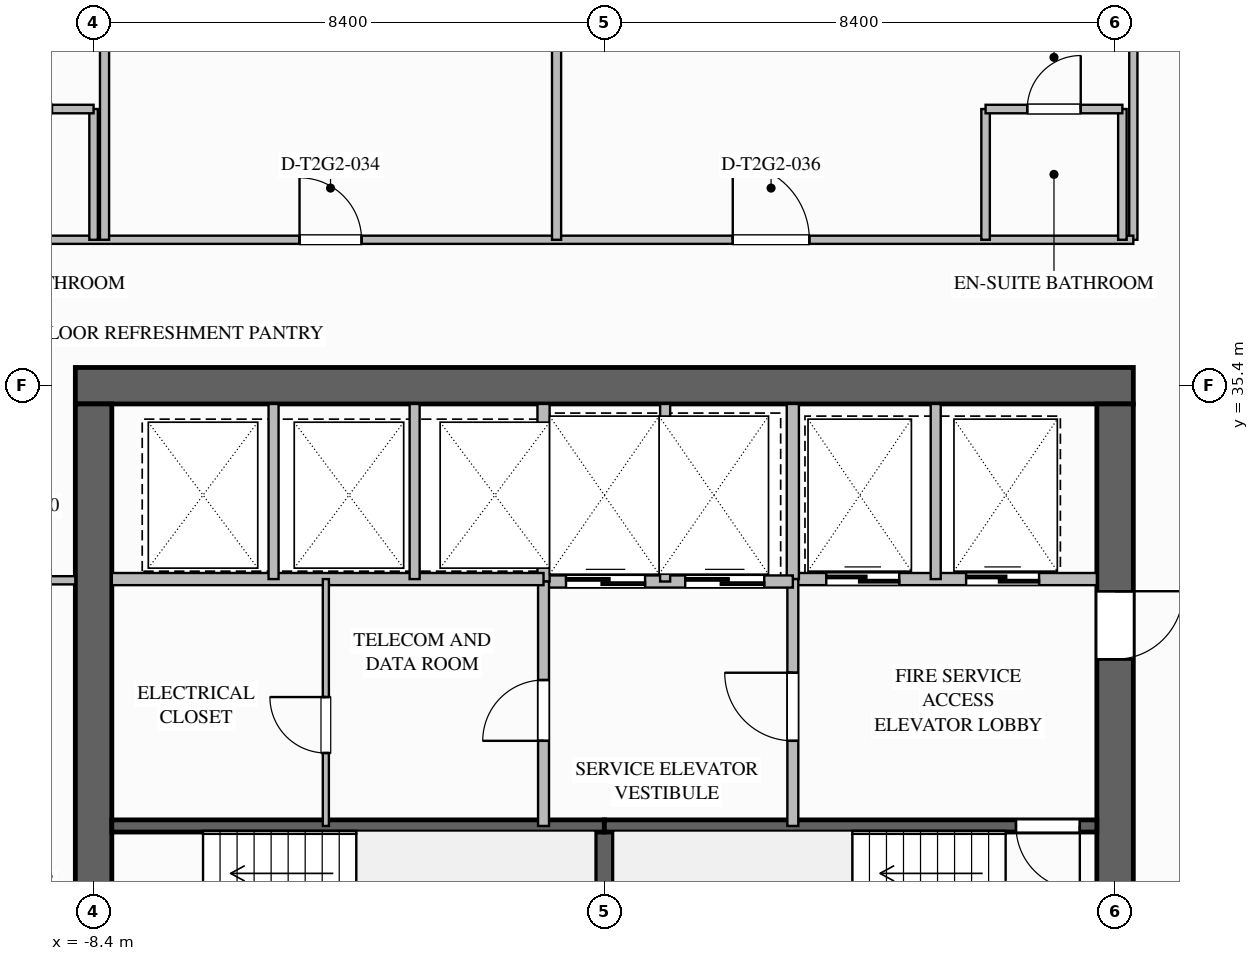
"""IFC4 building model, lengths in metres.
Left out: names, types, materials, properties, quantities, classifications, styles, units other than length and angle.
Written with IfcOpenShell. Run it as: python <this file> out.ifc"""

import sys

from ifc_helpers import new_model, si_unit, direction, frame, frame_2d, origin, place, context, subcontext, project, spatial, rectangle, extrude, element, fill, save


model = new_model("IFC4")
c1 = context("Model", 3, precision=1e-05, world=origin(), true_north=direction((0.0, 1.0)))
c2 = subcontext(c1, "Body", "Model", "MODEL_VIEW")
j1 = project(units=[si_unit("LENGTHUNIT", "METRE"), si_unit("PLANEANGLEUNIT", "RADIAN")], contexts=[c1])
p1 = place(None, origin())
s1 = spatial("IfcSite", under=j1, at=p1, CompositionType="ELEMENT")
p2 = place(p1, origin())
s2 = spatial("IfcBuilding", under=s1, at=p2, CompositionType="ELEMENT")
p3 = place(p2, frame((0.0, 0.0, 102.3)))
s3 = spatial("IfcBuildingStorey", under=s2, at=p3, CompositionType="ELEMENT", Elevation=102.3)
p4 = place(p3, frame((-8.7, 35.4, 0.0), z_axis=(0.0, 0.0, 1.0), x_axis=(1.0, 0.0, 0.0)))
e1 = element("IfcWall", 1, at=p4, inside=s3, PredefinedType="SHEAR", context=c2, shape_type="SweptSolid", body=[
    extrude(rectangle(XDim=17.4, YDim=0.6, at=frame_2d((8.7, 0.0))), origin(), (0.0, 0.0, 1.0), 3.5),
])
p5 = place(p3, frame((8.4, 35.1, 0.0), z_axis=(0.0, 0.0, 1.0), x_axis=(0.0, -1.0, 0.0)))
e2 = element("IfcWall", 2, at=p5, inside=s3, PredefinedType="SHEAR", context=c2, shape_type="SweptSolid", body=[
    extrude(rectangle(XDim=16.2, YDim=0.6, at=frame_2d((8.1, 0.0))), origin(), (0.0, 0.0, 1.0), 3.5),
])
p6 = place(p5, frame((3.08, 0.0, 0.0)))
e3 = element("IfcOpeningElement", 3, at=p6, cuts=e2, PredefinedType="OPENING", context=c2, shape_type="SweptSolid", body=[
    extrude(rectangle(XDim=1.12, YDim=2.1, at=frame_2d((0.56, 1.05))), frame((0.0, 0.31, 0.0), z_axis=(0.0, -1.0, 0.0), x_axis=(1.0, 0.0, 0.0)), (0.0, 0.0, 1.0), 0.62),
])
p7 = place(p5, frame((10.62, 0.0, 0.0)))
e4 = element("IfcOpeningElement", 4, at=p7, cuts=e2, PredefinedType="OPENING", context=c2, shape_type="SweptSolid", body=[
    extrude(rectangle(XDim=1.08, YDim=2.04, at=frame_2d((0.54, 1.02))), frame((0.0, 0.31, 0.0), z_axis=(0.0, -1.0, 0.0), x_axis=(1.0, 0.0, 0.0)), (0.0, 0.0, 1.0), 0.62),
])
p8 = place(p3, frame((-8.4, 18.9, 0.0), z_axis=(0.0, 0.0, 1.0), x_axis=(0.0, 1.0, 0.0)))
e5 = element("IfcWall", 5, at=p8, inside=s3, PredefinedType="SHEAR", context=c2, shape_type="SweptSolid", body=[
    extrude(rectangle(XDim=16.2, YDim=0.6, at=frame_2d((8.1, 0.0))), origin(), (0.0, 0.0, 1.0), 3.5),
])
p9 = place(p8, frame((4.5, 0.0, 0.0)))
e6 = element("IfcOpeningElement", 6, at=p9, cuts=e5, PredefinedType="OPENING", context=c2, shape_type="SweptSolid", body=[
    extrude(rectangle(XDim=1.08, YDim=2.04, at=frame_2d((0.54, 1.02))), frame((0.0, 0.31, 0.0), z_axis=(0.0, -1.0, 0.0), x_axis=(1.0, 0.0, 0.0)), (0.0, 0.0, 1.0), 0.62),
])
p10 = place(p3, frame((0.0, 25.04, 0.0), z_axis=(0.0, 0.0, 1.0), x_axis=(0.0, 1.0, 0.0)))
e7 = element("IfcWall", 7, at=p10, inside=s3, PredefinedType="SOLIDWALL", context=c2, shape_type="SweptSolid", body=[
    extrude(rectangle(XDim=3.12, YDim=0.3, at=frame_2d((1.56, 0.0))), origin(), (0.0, 0.0, 1.0), 3.24),
])
p11 = place(p3, frame((-8.1, 28.16, 0.0), z_axis=(0.0, 0.0, 1.0), x_axis=(1.0, 0.0, 0.0)))
e8 = element("IfcWall", 8, at=p11, inside=s3, PredefinedType="SOLIDWALL", context=c2, shape_type="SweptSolid", body=[
    extrude(rectangle(XDim=8.1, YDim=0.2, at=frame_2d((4.05, 0.0))), origin(), (0.0, 0.0, 1.0), 3.24),
])
p12 = place(p3, frame((8.1, 28.16, 0.0), z_axis=(0.0, 0.0, 1.0), x_axis=(-1.0, 0.0, 0.0)))
e9 = element("IfcWall", 9, at=p12, inside=s3, PredefinedType="SOLIDWALL", context=c2, shape_type="SweptSolid", body=[
    extrude(rectangle(XDim=8.1, YDim=0.2, at=frame_2d((4.05, 0.0))), origin(), (0.0, 0.0, 1.0), 3.24),
])
p13 = place(p12, frame((0.28, 0.0, 0.0)))
e10 = element("IfcOpeningElement", 10, at=p13, cuts=e9, PredefinedType="OPENING", context=c2, shape_type="SweptSolid", body=[
    extrude(rectangle(XDim=1.05, YDim=2.1, at=frame_2d((0.525, 1.05))), frame((0.0, 0.11, 0.0), z_axis=(0.0, -1.0, 0.0), x_axis=(1.0, 0.0, 0.0)), (0.0, 0.0, 1.0), 0.22),
])
p14 = place(p3, frame((3.1, 32.22, 0.0), z_axis=(0.0, 0.0, 1.0), x_axis=(1.0, 0.0, 0.0)))
e11 = element("IfcWall", 11, at=p14, inside=s3, PredefinedType="SOLIDWALL", context=c2, shape_type="SweptSolid", body=[
    extrude(rectangle(XDim=5.0, YDim=0.2, at=frame_2d((2.5, 0.0))), origin(), (0.0, 0.0, 1.0), 3.24),
])
p15 = place(p14, frame((0.55, 0.0, 0.0)))
e12 = element("IfcOpeningElement", 12, at=p15, cuts=e11, PredefinedType="OPENING", context=c2, shape_type="SweptSolid", body=[
    extrude(rectangle(XDim=1.2, YDim=2.2, at=frame_2d((0.6, 1.1))), frame((0.0, 0.11, 0.0), z_axis=(0.0, -1.0, 0.0), x_axis=(1.0, 0.0, 0.0)), (0.0, 0.0, 1.0), 0.22),
])
p16 = place(p14, frame((2.85, 0.0, 0.0)))
e13 = element("IfcOpeningElement", 13, at=p16, cuts=e11, PredefinedType="OPENING", context=c2, shape_type="SweptSolid", body=[
    extrude(rectangle(XDim=1.2, YDim=2.2, at=frame_2d((0.6, 1.1))), frame((0.0, 0.11, 0.0), z_axis=(0.0, -1.0, 0.0), x_axis=(1.0, 0.0, 0.0)), (0.0, 0.0, 1.0), 0.22),
])
p17 = place(p3, frame((3.1, 32.22, 0.0), z_axis=(0.0, 0.0, 1.0), x_axis=(0.0, 1.0, 0.0)))
e14 = element("IfcWall", 14, at=p17, inside=s3, PredefinedType="SOLIDWALL", context=c2, shape_type="SweptSolid", body=[
    extrude(rectangle(XDim=2.88, YDim=0.2, at=frame_2d((1.44, 0.0))), origin(), (0.0, 0.0, 1.0), 3.24),
])
p18 = place(p3, frame((5.45, 32.22, 0.0), z_axis=(0.0, 0.0, 1.0), x_axis=(0.0, 1.0, 0.0)))
e15 = element("IfcWall", 15, at=p18, inside=s3, PredefinedType="PARTITIONING", context=c2, shape_type="SweptSolid", body=[
    extrude(rectangle(XDim=2.88, YDim=0.165, at=frame_2d((1.44, 0.0))), origin(), (0.0, 0.0, 1.0), 3.24),
])
p19 = place(p3, frame((3.1, 28.16, 0.0), z_axis=(0.0, 0.0, 1.0), x_axis=(0.0, 1.0, 0.0)))
e16 = element("IfcWall", 16, at=p19, inside=s3, PredefinedType="SOLIDWALL", context=c2, shape_type="SweptSolid", body=[
    extrude(rectangle(XDim=4.06, YDim=0.18, at=frame_2d((2.03, 0.0))), origin(), (0.0, 0.0, 1.0), 3.24),
])
p20 = place(p19, frame((1.4, 0.0, 0.0)))
e17 = element("IfcOpeningElement", 17, at=p20, cuts=e16, PredefinedType="OPENING", context=c2, shape_type="SweptSolid", body=[
    extrude(rectangle(XDim=1.12, YDim=2.1, at=frame_2d((0.56, 1.05))), frame((0.0, 0.1, 0.0), z_axis=(0.0, -1.0, 0.0), x_axis=(1.0, 0.0, 0.0)), (0.0, 0.0, 1.0), 0.2),
])
p21 = place(p3, frame((-1.0, 32.18, 0.0), z_axis=(0.0, 0.0, 1.0), x_axis=(1.0, 0.0, 0.0)))
e18 = element("IfcWall", 18, at=p21, inside=s3, PredefinedType="SOLIDWALL", context=c2, shape_type="SweptSolid", body=[
    extrude(rectangle(XDim=4.1, YDim=0.2, at=frame_2d((2.05, 0.0))), origin(), (0.0, 0.0, 1.0), 3.24),
])
p22 = place(p21, frame((0.37, 0.0, 0.0)))
e19 = element("IfcOpeningElement", 19, at=p22, cuts=e18, PredefinedType="OPENING", context=c2, shape_type="SweptSolid", body=[
    extrude(rectangle(XDim=1.3, YDim=2.2, at=frame_2d((0.65, 1.1))), frame((0.0, 0.11, 0.0), z_axis=(0.0, -1.0, 0.0), x_axis=(1.0, 0.0, 0.0)), (0.0, 0.0, 1.0), 0.22),
])
p23 = place(p21, frame((2.33, 0.0, 0.0)))
e20 = element("IfcOpeningElement", 20, at=p23, cuts=e18, PredefinedType="OPENING", context=c2, shape_type="SweptSolid", body=[
    extrude(rectangle(XDim=1.3, YDim=2.2, at=frame_2d((0.65, 1.1))), frame((0.0, 0.11, 0.0), z_axis=(0.0, -1.0, 0.0), x_axis=(1.0, 0.0, 0.0)), (0.0, 0.0, 1.0), 0.22),
])
p24 = place(p3, frame((-1.0, 32.18, 0.0), z_axis=(0.0, 0.0, 1.0), x_axis=(0.0, 1.0, 0.0)))
e21 = element("IfcWall", 21, at=p24, inside=s3, PredefinedType="SOLIDWALL", context=c2, shape_type="SweptSolid", body=[
    extrude(rectangle(XDim=2.92, YDim=0.2, at=frame_2d((1.46, 0.0))), origin(), (0.0, 0.0, 1.0), 3.24),
])
p25 = place(p3, frame((1.0, 32.18, 0.0), z_axis=(0.0, 0.0, 1.0), x_axis=(0.0, 1.0, 0.0)))
e22 = element("IfcWall", 22, at=p25, inside=s3, PredefinedType="PARTITIONING", context=c2, shape_type="SweptSolid", body=[
    extrude(rectangle(XDim=2.92, YDim=0.165, at=frame_2d((1.46, 0.0))), origin(), (0.0, 0.0, 1.0), 3.24),
])
p26 = place(p3, frame((-1.0, 28.16, 0.0), z_axis=(0.0, 0.0, 1.0), x_axis=(0.0, 1.0, 0.0)))
e23 = element("IfcWall", 23, at=p26, inside=s3, PredefinedType="SOLIDWALL", context=c2, shape_type="SweptSolid", body=[
    extrude(rectangle(XDim=4.02, YDim=0.18, at=frame_2d((2.01, 0.0))), origin(), (0.0, 0.0, 1.0), 3.24),
])
p27 = place(p26, frame((1.4, 0.0, 0.0)))
e24 = element("IfcOpeningElement", 24, at=p27, cuts=e23, PredefinedType="OPENING", context=c2, shape_type="SweptSolid", body=[
    extrude(rectangle(XDim=1.0, YDim=2.1, at=frame_2d((0.5, 1.05))), frame((0.0, 0.1, 0.0), z_axis=(0.0, -1.0, 0.0), x_axis=(1.0, 0.0, 0.0)), (0.0, 0.0, 1.0), 0.2),
])
p28 = place(p3, frame((-8.1, 32.22, 0.0), z_axis=(0.0, 0.0, 1.0), x_axis=(1.0, 0.0, 0.0)))
e25 = element("IfcWall", 25, at=p28, inside=s3, PredefinedType="SOLIDWALL", context=c2, shape_type="SweptSolid", body=[
    extrude(rectangle(XDim=7.1, YDim=0.2, at=frame_2d((3.55, 0.0))), origin(), (0.0, 0.0, 1.0), 3.24),
])
for number, where, z_axis, x_axis in (
    (26, (-5.44, 32.22, 0.0), (0.0, 0.0, 1.0), (0.0, 1.0, 0.0)),
    (27, (-3.12, 32.22, 0.0), (0.0, 0.0, 1.0), (0.0, 1.0, 0.0)),
):
    element("IfcWall", number, at=place(p3, frame(where, z_axis=z_axis, x_axis=x_axis)), inside=s3, PredefinedType="PARTITIONING", context=c2, shape_type="SweptSolid", body=[
        extrude(rectangle(XDim=2.88, YDim=0.165, at=frame_2d((1.44, 0.0))), origin(), (0.0, 0.0, 1.0), 3.24),
    ])
p29 = place(p3, frame((-4.58, 28.16, 0.0), z_axis=(0.0, 0.0, 1.0), x_axis=(0.0, 1.0, 0.0)))
e28 = element("IfcWall", 28, at=p29, inside=s3, PredefinedType="PARTITIONING", context=c2, shape_type="SweptSolid", body=[
    extrude(rectangle(XDim=4.06, YDim=0.1, at=frame_2d((2.03, 0.0))), origin(), (0.0, 0.0, 1.0), 3.24),
])
p30 = place(p29, frame((1.2, 0.0, 0.0)))
e29 = element("IfcOpeningElement", 29, at=p30, cuts=e28, PredefinedType="OPENING", context=c2, shape_type="SweptSolid", body=[
    extrude(rectangle(XDim=0.92, YDim=2.1, at=frame_2d((0.46, 1.05))), frame((0.0, 0.06, 0.0), z_axis=(0.0, -1.0, 0.0), x_axis=(1.0, 0.0, 0.0)), (0.0, 0.0, 1.0), 0.12),
])
p31 = place(p3, frame((-10.8, 32.2, 0.0), z_axis=(0.0, 0.0, 1.0), x_axis=(1.0, 0.0, 0.0)))
e30 = element("IfcWall", 30, at=p31, inside=s3, PredefinedType="PARTITIONING", context=c2, shape_type="SweptSolid", body=[
    extrude(rectangle(XDim=2.1, YDim=0.135, at=frame_2d((1.05, 0.0))), origin(), (0.0, 0.0, 1.0), 3.24),
])
p32 = place(p31, frame((0.55, 0.0, 0.0)))
e31 = element("IfcOpeningElement", 31, at=p32, cuts=e30, PredefinedType="OPENING", context=c2, shape_type="SweptSolid", body=[
    extrude(rectangle(XDim=0.92, YDim=2.1, at=frame_2d((0.46, 1.05))), frame((0.0, 0.077, 0.0), z_axis=(0.0, -1.0, 0.0), x_axis=(1.0, 0.0, 0.0)), (0.0, 0.0, 1.0), 0.155),
])
p33 = place(p3, frame((8.7, 37.8, 0.0), z_axis=(0.0, 0.0, 1.0), x_axis=(0.0, 1.0, 0.0)))
e32 = element("IfcWall", 32, at=p33, inside=s3, PredefinedType="PARTITIONING", context=c2, shape_type="SweptSolid", body=[
    extrude(rectangle(XDim=5.4, YDim=0.135, at=frame_2d((2.7, 0.0))), origin(), (0.0, 0.0, 1.0), 3.24),
])
p34 = place(p3, frame((-16.2, 37.8, 0.0), z_axis=(0.0, 0.0, 1.0), x_axis=(1.0, 0.0, 0.0)))
e33 = element("IfcWall", 33, at=p34, inside=s3, PredefinedType="PARTITIONING", context=c2, shape_type="SweptSolid", body=[
    extrude(rectangle(XDim=24.9, YDim=0.135, at=frame_2d((12.45, 0.0))), origin(), (0.0, 0.0, 1.0), 3.24),
])
p35 = place(p34, frame((2.145, 0.0, 0.0)))
e34 = element("IfcOpeningElement", 34, at=p35, cuts=e33, PredefinedType="OPENING", context=c2, shape_type="SweptSolid", body=[
    extrude(rectangle(XDim=1.26, YDim=2.2, at=frame_2d((0.63, 1.1))), frame((0.0, 0.077, 0.0), z_axis=(0.0, -1.0, 0.0), x_axis=(1.0, 0.0, 0.0)), (0.0, 0.0, 1.0), 0.155),
])
p36 = place(p34, frame((11.187, 0.0, 0.0)))
e35 = element("IfcOpeningElement", 35, at=p36, cuts=e33, PredefinedType="OPENING", context=c2, shape_type="SweptSolid", body=[
    extrude(rectangle(XDim=1.02, YDim=2.15, at=frame_2d((0.51, 1.075))), frame((0.0, 0.077, 0.0), z_axis=(0.0, -1.0, 0.0), x_axis=(1.0, 0.0, 0.0)), (0.0, 0.0, 1.0), 0.155),
])
p37 = place(p34, frame((18.312, 0.0, 0.0)))
e36 = element("IfcOpeningElement", 36, at=p37, cuts=e33, PredefinedType="OPENING", context=c2, shape_type="SweptSolid", body=[
    extrude(rectangle(XDim=1.26, YDim=2.2, at=frame_2d((0.63, 1.1))), frame((0.0, 0.077, 0.0), z_axis=(0.0, -1.0, 0.0), x_axis=(1.0, 0.0, 0.0)), (0.0, 0.0, 1.0), 0.155),
])
p38 = place(p3, frame((-8.4, 37.8, 0.0), z_axis=(0.0, 0.0, 1.0), x_axis=(0.0, 1.0, 0.0)))
e37 = element("IfcWall", 37, at=p38, inside=s3, PredefinedType="PLUMBINGWALL", context=c2, shape_type="SweptSolid", body=[
    extrude(rectangle(XDim=2.15, YDim=0.14, at=frame_2d((1.075, 0.0))), origin(), (0.0, 0.0, 1.0), 2.617),
])
p39 = place(p3, frame((-10.65, 39.95, 0.0), z_axis=(0.0, 0.0, 1.0), x_axis=(1.0, 0.0, 0.0)))
e38 = element("IfcWall", 38, at=p39, inside=s3, PredefinedType="PLUMBINGWALL", context=c2, shape_type="SweptSolid", body=[
    extrude(rectangle(XDim=2.25, YDim=0.14, at=frame_2d((1.125, 0.0))), origin(), (0.0, 0.0, 1.0), 3.24),
])
p40 = place(p39, frame((0.685, 0.0, 0.0)))
e39 = element("IfcOpeningElement", 39, at=p40, cuts=e38, PredefinedType="OPENING", context=c2, shape_type="SweptSolid", body=[
    extrude(rectangle(XDim=0.88, YDim=2.1, at=frame_2d((0.44, 1.05))), frame((0.0, 0.08, 0.0), z_axis=(0.0, -1.0, 0.0), x_axis=(1.0, 0.0, 0.0)), (0.0, 0.0, 1.0), 0.16),
])
p41 = place(p3, frame((-8.22, 37.8, 0.0), z_axis=(0.0, 0.0, 1.0), x_axis=(0.0, 1.0, 0.0)))
e40 = element("IfcWall", 40, at=p41, inside=s3, PredefinedType="PARTITIONING", context=c2, shape_type="SweptSolid", body=[
    extrude(rectangle(XDim=16.08, YDim=0.15, at=frame_2d((8.04, 0.0))), origin(), (0.0, 0.0, 1.0), 2.452),
])
p42 = place(p3, frame((-0.786, 37.8, 0.0), z_axis=(0.0, 0.0, 1.0), x_axis=(0.0, 1.0, 0.0)))
e41 = element("IfcWall", 41, at=p42, inside=s3, PredefinedType="PARTITIONING", context=c2, shape_type="SweptSolid", body=[
    extrude(rectangle(XDim=15.4, YDim=0.15, at=frame_2d((7.7, 0.0))), origin(), (0.0, 0.0, 1.0), 3.24),
])
p43 = place(p3, frame((6.27, 37.8, 0.0), z_axis=(0.0, 0.0, 1.0), x_axis=(0.0, 1.0, 0.0)))
e42 = element("IfcWall", 42, at=p43, inside=s3, PredefinedType="PLUMBINGWALL", context=c2, shape_type="SweptSolid", body=[
    extrude(rectangle(XDim=2.15, YDim=0.14, at=frame_2d((1.075, 0.0))), origin(), (0.0, 0.0, 1.0), 3.24),
])
p44 = place(p3, frame((8.52, 37.8, 0.0), z_axis=(0.0, 0.0, 1.0), x_axis=(0.0, 1.0, 0.0)))
e43 = element("IfcWall", 43, at=p44, inside=s3, PredefinedType="PLUMBINGWALL", context=c2, shape_type="SweptSolid", body=[
    extrude(rectangle(XDim=2.15, YDim=0.14, at=frame_2d((1.075, 0.0))), origin(), (0.0, 0.0, 1.0), 2.617),
])
p45 = place(p3, frame((6.27, 39.95, 0.0), z_axis=(0.0, 0.0, 1.0), x_axis=(1.0, 0.0, 0.0)))
e44 = element("IfcWall", 44, at=p45, inside=s3, PredefinedType="PLUMBINGWALL", context=c2, shape_type="SweptSolid", body=[
    extrude(rectangle(XDim=2.25, YDim=0.14, at=frame_2d((1.125, 0.0))), origin(), (0.0, 0.0, 1.0), 3.24),
])
p46 = place(p45, frame((0.685, 0.0, 0.0)))
e45 = element("IfcOpeningElement", 45, at=p46, cuts=e44, PredefinedType="OPENING", context=c2, shape_type="SweptSolid", body=[
    extrude(rectangle(XDim=0.88, YDim=2.1, at=frame_2d((0.44, 1.05))), frame((0.0, 0.08, 0.0), z_axis=(0.0, -1.0, 0.0), x_axis=(1.0, 0.0, 0.0)), (0.0, 0.0, 1.0), 0.16),
])
p47 = place(p13, origin())
e46 = element("IfcDoor", 46, at=p47, inside=s3, OperationType="SINGLE_SWING_LEFT", PredefinedType="DOOR", context=c2, shape_type="SweptSolid", body=[
    extrude(rectangle(XDim=1.05, YDim=2.1, at=frame_2d((0.525, 1.05))), frame((0.0, 0.025, 0.0), z_axis=(0.0, -1.0, 0.0), x_axis=(1.0, 0.0, 0.0)), (0.0, 0.0, 1.0), 0.05),
])
fill(e10, e46)
p48 = place(p15, origin())
e47 = element("IfcDoor", 47, at=p48, inside=s3, OperationType="SLIDING_TO_LEFT", PredefinedType="DOOR", context=c2, shape_type="SweptSolid", body=[
    extrude(rectangle(XDim=1.2, YDim=2.2, at=frame_2d((0.6, 1.1))), frame((0.0, 0.025, 0.0), z_axis=(0.0, -1.0, 0.0), x_axis=(1.0, 0.0, 0.0)), (0.0, 0.0, 1.0), 0.05),
])
fill(e12, e47)
p49 = place(p16, origin())
e48 = element("IfcDoor", 48, at=p49, inside=s3, OperationType="SLIDING_TO_LEFT", PredefinedType="DOOR", context=c2, shape_type="SweptSolid", body=[
    extrude(rectangle(XDim=1.2, YDim=2.2, at=frame_2d((0.6, 1.1))), frame((0.0, 0.025, 0.0), z_axis=(0.0, -1.0, 0.0), x_axis=(1.0, 0.0, 0.0)), (0.0, 0.0, 1.0), 0.05),
])
fill(e13, e48)
p50 = place(p20, origin())
e49 = element("IfcDoor", 49, at=p50, inside=s3, OperationType="SINGLE_SWING_RIGHT", PredefinedType="DOOR", context=c2, shape_type="SweptSolid", body=[
    extrude(rectangle(XDim=1.12, YDim=2.1, at=frame_2d((0.56, 1.05))), frame((0.0, 0.025, 0.0), z_axis=(0.0, -1.0, 0.0), x_axis=(1.0, 0.0, 0.0)), (0.0, 0.0, 1.0), 0.05),
])
fill(e17, e49)
p51 = place(p6, origin())
e50 = element("IfcDoor", 50, at=p51, inside=s3, OperationType="SINGLE_SWING_LEFT", PredefinedType="DOOR", context=c2, shape_type="SweptSolid", body=[
    extrude(rectangle(XDim=1.12, YDim=2.1, at=frame_2d((0.56, 1.05))), frame((0.0, 0.025, 0.0), z_axis=(0.0, -1.0, 0.0), x_axis=(1.0, 0.0, 0.0)), (0.0, 0.0, 1.0), 0.05),
])
fill(e3, e50)
p52 = place(p22, origin())
e51 = element("IfcDoor", 51, at=p52, inside=s3, OperationType="SLIDING_TO_LEFT", PredefinedType="DOOR", context=c2, shape_type="SweptSolid", body=[
    extrude(rectangle(XDim=1.3, YDim=2.2, at=frame_2d((0.65, 1.1))), frame((0.0, 0.025, 0.0), z_axis=(0.0, -1.0, 0.0), x_axis=(1.0, 0.0, 0.0)), (0.0, 0.0, 1.0), 0.05),
])
fill(e19, e51)
p53 = place(p23, origin())
e52 = element("IfcDoor", 52, at=p53, inside=s3, OperationType="SLIDING_TO_LEFT", PredefinedType="DOOR", context=c2, shape_type="SweptSolid", body=[
    extrude(rectangle(XDim=1.3, YDim=2.2, at=frame_2d((0.65, 1.1))), frame((0.0, 0.025, 0.0), z_axis=(0.0, -1.0, 0.0), x_axis=(1.0, 0.0, 0.0)), (0.0, 0.0, 1.0), 0.05),
])
fill(e20, e52)
p54 = place(p27, origin())
e53 = element("IfcDoor", 53, at=p54, inside=s3, OperationType="SINGLE_SWING_LEFT", PredefinedType="DOOR", context=c2, shape_type="SweptSolid", body=[
    extrude(rectangle(XDim=1.0, YDim=2.1, at=frame_2d((0.5, 1.05))), frame((0.0, 0.025, 0.0), z_axis=(0.0, -1.0, 0.0), x_axis=(1.0, 0.0, 0.0)), (0.0, 0.0, 1.0), 0.05),
])
fill(e24, e53)
p55 = place(p30, origin())
e54 = element("IfcDoor", 54, at=p55, inside=s3, OperationType="SINGLE_SWING_RIGHT", PredefinedType="DOOR", context=c2, shape_type="SweptSolid", body=[
    extrude(rectangle(XDim=0.92, YDim=2.1, at=frame_2d((0.46, 1.05))), frame((0.0, 0.025, 0.0), z_axis=(0.0, -1.0, 0.0), x_axis=(1.0, 0.0, 0.0)), (0.0, 0.0, 1.0), 0.05),
])
fill(e29, e54)
p56 = place(p36, origin())
e55 = element("IfcDoor", 55, at=p56, inside=s3, OperationType="SINGLE_SWING_LEFT", PredefinedType="DOOR", context=c2, shape_type="SweptSolid", body=[
    extrude(rectangle(XDim=1.02, YDim=2.15, at=frame_2d((0.51, 1.075))), frame((0.0, 0.025, 0.0), z_axis=(0.0, -1.0, 0.0), x_axis=(1.0, 0.0, 0.0)), (0.0, 0.0, 1.0), 0.05),
])
fill(e35, e55)
p57 = place(p46, origin())
e56 = element("IfcDoor", 56, at=p57, inside=s3, OperationType="SINGLE_SWING_RIGHT", PredefinedType="DOOR", context=c2, shape_type="SweptSolid", body=[
    extrude(rectangle(XDim=0.88, YDim=2.1, at=frame_2d((0.44, 1.05))), frame((0.0, 0.025, 0.0), z_axis=(0.0, -1.0, 0.0), x_axis=(1.0, 0.0, 0.0)), (0.0, 0.0, 1.0), 0.05),
])
fill(e45, e56)
p58 = place(p37, origin())
e57 = element("IfcDoor", 57, at=p58, inside=s3, OperationType="SINGLE_SWING_LEFT", PredefinedType="DOOR", context=c2, shape_type="SweptSolid", body=[
    extrude(rectangle(XDim=1.26, YDim=2.2, at=frame_2d((0.63, 1.1))), frame((0.0, 0.025, 0.0), z_axis=(0.0, -1.0, 0.0), x_axis=(1.0, 0.0, 0.0)), (0.0, 0.0, 1.0), 0.05),
])
fill(e36, e57)
save(model, sys.argv[1])
